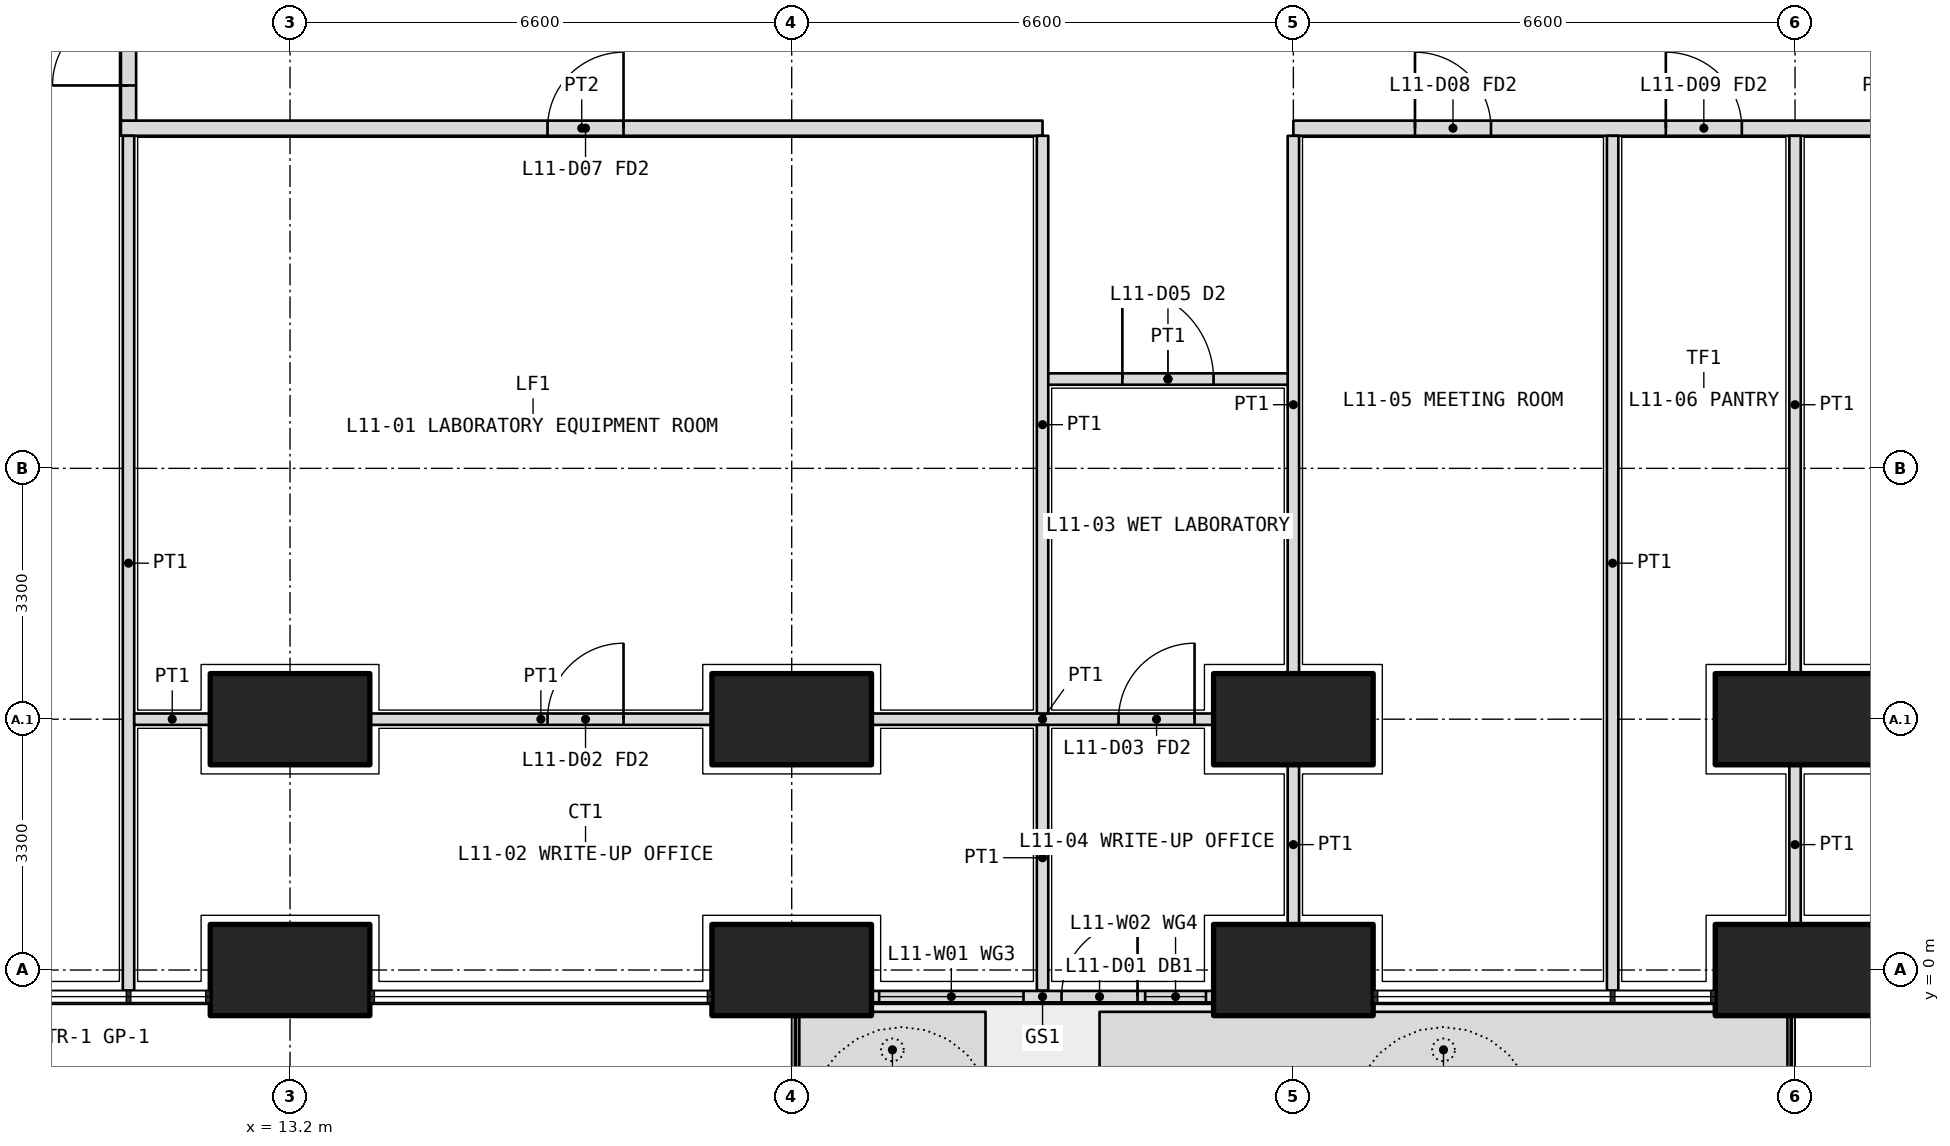
"""IFC4 building model, lengths in metres.
Left out: names, types, materials, properties, quantities, classifications, styles, units other than length and angle.
Written with IfcOpenShell. Run it as: python <this file> out.ifc"""

import sys

from ifc_helpers import new_model, si_unit, direction, frame, frame_2d, origin, origin_2d, place, context, subcontext, project, spatial, polyline, rectangle, outline, extrude, element, fill, save


model = new_model("IFC4")
c1 = context("Model", 3, precision=1e-05, world=origin(), true_north=direction((0.0, 1.0)))
c2 = subcontext(c1, "Body", "Model", "MODEL_VIEW")
j1 = project(units=[si_unit("LENGTHUNIT", "METRE"), si_unit("PLANEANGLEUNIT", "RADIAN")], contexts=[c1])
p1 = place(None, origin())
s1 = spatial("IfcSite", under=j1, at=p1, CompositionType="ELEMENT")
p2 = place(p1, origin())
s2 = spatial("IfcBuilding", under=s1, at=p2, CompositionType="ELEMENT")
p3 = place(p2, frame((0.0, 0.0, 50.7)))
s3 = spatial("IfcBuildingStorey", under=s2, at=p3, CompositionType="ELEMENT", Elevation=50.7)
for number, where, z_axis, x_axis in (
    (1, (13.2, 0.0, 0.0), (0.0, 0.0, 1.0), (1.0, 0.0, 0.0)),
    (2, (19.8, 0.0, 0.0), (0.0, 0.0, 1.0), (1.0, 0.0, 0.0)),
    (3, (26.4, 0.0, 0.0), (0.0, 0.0, 1.0), (1.0, 0.0, 0.0)),
    (4, (33.0, 0.0, 0.0), (0.0, 0.0, 1.0), (1.0, 0.0, 0.0)),
    (5, (13.2, 3.3, 0.0), (0.0, 0.0, 1.0), (1.0, 0.0, 0.0)),
    (6, (19.8, 3.3, 0.0), (0.0, 0.0, 1.0), (1.0, 0.0, 0.0)),
    (7, (26.4, 3.3, 0.0), (0.0, 0.0, 1.0), (1.0, 0.0, 0.0)),
    (8, (33.0, 3.3, 0.0), (0.0, 0.0, 1.0), (1.0, 0.0, 0.0)),
):
    element("IfcColumn", number, at=place(p3, frame(where, z_axis=z_axis, x_axis=x_axis)), inside=s3, PredefinedType="COLUMN", context=c2, shape_type="SweptSolid", body=[
        extrude(rectangle(XDim=2.1, YDim=1.2, at=origin_2d()), origin(), (0.0, 0.0, 1.0), 4.2),
    ])
p4 = place(p3, origin())
e9 = element("IfcWall", 9, at=p4, inside=s3, PredefinedType="USERDEFINED", context=c2, shape_type="SweptSolid", body=[
    extrude(outline(polyline([(19.9, -1.55), (22.35, -1.55), (22.35, -0.55), (19.9, -0.55), (19.9, -1.55)]), holes=[polyline([(20.05, -1.4), (22.2, -1.4), (22.2, -0.7), (20.05, -0.7), (20.05, -1.4)])]), origin(), (0.0, 0.0, 1.0), 1.05),
])
p5 = place(p3, origin())
e10 = element("IfcWall", 10, at=p5, inside=s3, PredefinedType="USERDEFINED", context=c2, shape_type="SweptSolid", body=[
    extrude(outline(polyline([(23.85, -1.55), (32.9, -1.55), (32.9, -0.55), (23.85, -0.55), (23.85, -1.55)]), holes=[polyline([(24.0, -1.4), (32.75, -1.4), (32.75, -0.7), (24.0, -0.7), (24.0, -1.4)])]), origin(), (0.0, 0.0, 1.0), 1.05),
])
p6 = place(p3, frame((20.85, -0.35, 0.0), z_axis=(0.0, 0.0, 1.0), x_axis=(1.0, 0.0, 0.0)))
e11 = element("IfcWall", 11, at=p6, inside=s3, PredefinedType="SOLIDWALL", context=c2, shape_type="SweptSolid", body=[
    extrude(rectangle(XDim=4.5, YDim=0.15, at=frame_2d((2.25, 0.0))), origin(), (0.0, 0.0, 1.0), 2.7),
])
p7 = place(p6, frame((2.5, 0.0, 0.0)))
e12 = element("IfcOpeningElement", 12, at=p7, cuts=e11, PredefinedType="OPENING", context=c2, shape_type="SweptSolid", body=[
    extrude(rectangle(XDim=1.0, YDim=2.4, at=frame_2d((0.5, 1.2))), frame((0.0, 0.085, 0.0), z_axis=(0.0, -1.0, 0.0), x_axis=(1.0, 0.0, 0.0)), (0.0, 0.0, 1.0), 0.17),
])
p8 = place(p6, frame((0.1, 0.0, 0.1)))
e13 = element("IfcOpeningElement", 13, at=p8, cuts=e11, PredefinedType="OPENING", context=c2, shape_type="SweptSolid", body=[
    extrude(rectangle(XDim=1.9, YDim=2.3, at=frame_2d((0.95, 1.15))), frame((0.0, 0.085, 0.0), z_axis=(0.0, -1.0, 0.0), x_axis=(1.0, 0.0, 0.0)), (0.0, 0.0, 1.0), 0.17),
])
p9 = place(p6, frame((3.6, 0.0, 0.1)))
e14 = element("IfcOpeningElement", 14, at=p9, cuts=e11, PredefinedType="OPENING", context=c2, shape_type="SweptSolid", body=[
    extrude(rectangle(XDim=0.8, YDim=2.3, at=frame_2d((0.4, 1.15))), frame((0.0, 0.085, 0.0), z_axis=(0.0, -1.0, 0.0), x_axis=(1.0, 0.0, 0.0)), (0.0, 0.0, 1.0), 0.17),
])
p10 = place(p3, frame((10.975, 11.075, 0.0), z_axis=(0.0, 0.0, 1.0), x_axis=(1.0, 0.0, 0.0)))
e15 = element("IfcWall", 15, at=p10, inside=s3, PredefinedType="PARTITIONING", context=c2, shape_type="SweptSolid", body=[
    extrude(rectangle(XDim=12.125, YDim=0.2, at=frame_2d((6.062, 0.0))), origin(), (0.0, 0.0, 1.0), 2.85),
])
p11 = place(p10, frame((5.613, 0.0, 0.0)))
e16 = element("IfcOpeningElement", 16, at=p11, cuts=e15, PredefinedType="OPENING", context=c2, shape_type="SweptSolid", body=[
    extrude(rectangle(XDim=1.0, YDim=2.1, at=frame_2d((0.5, 1.05))), frame((0.0, 0.11, 0.0), z_axis=(0.0, -1.0, 0.0), x_axis=(1.0, 0.0, 0.0)), (0.0, 0.0, 1.0), 0.22),
])
p12 = place(p3, frame((26.4, 11.075, 0.0), z_axis=(0.0, 0.0, 1.0), x_axis=(1.0, 0.0, 0.0)))
e17 = element("IfcWall", 17, at=p12, inside=s3, PredefinedType="PARTITIONING", context=c2, shape_type="SweptSolid", body=[
    extrude(rectangle(XDim=15.425, YDim=0.2, at=frame_2d((7.712, 0.0))), origin(), (0.0, 0.0, 1.0), 2.85),
])
p13 = place(p12, frame((1.6, 0.0, 0.0)))
e18 = element("IfcOpeningElement", 18, at=p13, cuts=e17, PredefinedType="OPENING", context=c2, shape_type="SweptSolid", body=[
    extrude(rectangle(XDim=1.0, YDim=2.1, at=frame_2d((0.5, 1.05))), frame((0.0, 0.11, 0.0), z_axis=(0.0, -1.0, 0.0), x_axis=(1.0, 0.0, 0.0)), (0.0, 0.0, 1.0), 0.22),
])
p14 = place(p12, frame((4.9, 0.0, 0.0)))
e19 = element("IfcOpeningElement", 19, at=p14, cuts=e17, PredefinedType="OPENING", context=c2, shape_type="SweptSolid", body=[
    extrude(rectangle(XDim=1.0, YDim=2.1, at=frame_2d((0.5, 1.05))), frame((0.0, 0.11, 0.0), z_axis=(0.0, -1.0, 0.0), x_axis=(1.0, 0.0, 0.0)), (0.0, 0.0, 1.0), 0.22),
])
p15 = place(p12, frame((10.363, 0.0, 0.0)))
e20 = element("IfcOpeningElement", 20, at=p15, cuts=e17, PredefinedType="OPENING", context=c2, shape_type="SweptSolid", body=[
    extrude(rectangle(XDim=1.2, YDim=2.1, at=frame_2d((0.6, 1.05))), frame((0.0, 0.11, 0.0), z_axis=(0.0, -1.0, 0.0), x_axis=(1.0, 0.0, 0.0)), (0.0, 0.0, 1.0), 0.22),
])
p16 = place(p3, frame((11.075, 11.175, 0.0), z_axis=(0.0, 0.0, 1.0), x_axis=(0.0, 1.0, 0.0)))
e21 = element("IfcWall", 21, at=p16, inside=s3, PredefinedType="PARTITIONING", context=c2, shape_type="SweptSolid", body=[
    extrude(rectangle(XDim=23.85, YDim=0.2, at=frame_2d((11.925, 0.0))), origin(), (0.0, 0.0, 1.0), 2.85),
])
p17 = place(p16, frame((0.462, 0.0, 0.0)))
e22 = element("IfcOpeningElement", 22, at=p17, cuts=e21, PredefinedType="OPENING", context=c2, shape_type="SweptSolid", body=[
    extrude(rectangle(XDim=1.0, YDim=2.1, at=frame_2d((0.5, 1.05))), frame((0.0, 0.11, 0.0), z_axis=(0.0, -1.0, 0.0), x_axis=(1.0, 0.0, 0.0)), (0.0, 0.0, 1.0), 0.22),
])
p18 = place(p16, frame((2.575, 0.0, 0.0)))
e23 = element("IfcOpeningElement", 23, at=p18, cuts=e21, PredefinedType="OPENING", context=c2, shape_type="SweptSolid", body=[
    extrude(rectangle(XDim=1.0, YDim=2.1, at=frame_2d((0.5, 1.05))), frame((0.0, 0.11, 0.0), z_axis=(0.0, -1.0, 0.0), x_axis=(1.0, 0.0, 0.0)), (0.0, 0.0, 1.0), 0.22),
])
p19 = place(p16, frame((5.65, 0.0, 0.0)))
e24 = element("IfcOpeningElement", 24, at=p19, cuts=e21, PredefinedType="OPENING", context=c2, shape_type="SweptSolid", body=[
    extrude(rectangle(XDim=0.9, YDim=2.1, at=frame_2d((0.45, 1.05))), frame((0.0, 0.11, 0.0), z_axis=(0.0, -1.0, 0.0), x_axis=(1.0, 0.0, 0.0)), (0.0, 0.0, 1.0), 0.22),
])
p20 = place(p16, frame((9.5, 0.0, 0.0)))
e25 = element("IfcOpeningElement", 25, at=p20, cuts=e21, PredefinedType="OPENING", context=c2, shape_type="SweptSolid", body=[
    extrude(rectangle(XDim=0.9, YDim=2.1, at=frame_2d((0.45, 1.05))), frame((0.0, 0.11, 0.0), z_axis=(0.0, -1.0, 0.0), x_axis=(1.0, 0.0, 0.0)), (0.0, 0.0, 1.0), 0.22),
])
p21 = place(p16, frame((13.025, 0.0, 0.0)))
e26 = element("IfcOpeningElement", 26, at=p21, cuts=e21, PredefinedType="OPENING", context=c2, shape_type="SweptSolid", body=[
    extrude(rectangle(XDim=1.0, YDim=2.1, at=frame_2d((0.5, 1.05))), frame((0.0, 0.11, 0.0), z_axis=(0.0, -1.0, 0.0), x_axis=(1.0, 0.0, 0.0)), (0.0, 0.0, 1.0), 0.22),
])
p22 = place(p16, frame((18.025, 0.0, 0.0)))
e27 = element("IfcOpeningElement", 27, at=p22, cuts=e21, PredefinedType="OPENING", context=c2, shape_type="SweptSolid", body=[
    extrude(rectangle(XDim=1.0, YDim=2.1, at=frame_2d((0.5, 1.05))), frame((0.0, 0.11, 0.0), z_axis=(0.0, -1.0, 0.0), x_axis=(1.0, 0.0, 0.0)), (0.0, 0.0, 1.0), 0.22),
])
p23 = place(p16, frame((22.387, 0.0, 0.0)))
e28 = element("IfcOpeningElement", 28, at=p23, cuts=e21, PredefinedType="OPENING", context=c2, shape_type="SweptSolid", body=[
    extrude(rectangle(XDim=1.0, YDim=2.1, at=frame_2d((0.5, 1.05))), frame((0.0, 0.11, 0.0), z_axis=(0.0, -1.0, 0.0), x_axis=(1.0, 0.0, 0.0)), (0.0, 0.0, 1.0), 0.22),
])
p24 = place(p3, frame((11.075, -0.27, 0.0), z_axis=(0.0, 0.0, 1.0), x_axis=(0.0, 1.0, 0.0)))
e29 = element("IfcWall", 29, at=p24, inside=s3, PredefinedType="PARTITIONING", context=c2, shape_type="SweptSolid", body=[
    extrude(rectangle(XDim=11.245, YDim=0.15, at=frame_2d((5.623, 0.0))), origin(), (0.0, 0.0, 1.0), 2.7),
])
p25 = place(p3, frame((11.15, 3.3, 0.0), z_axis=(0.0, 0.0, 1.0), x_axis=(1.0, 0.0, 0.0)))
e30 = element("IfcWall", 30, at=p25, inside=s3, PredefinedType="PARTITIONING", context=c2, shape_type="SweptSolid", body=[
    extrude(rectangle(XDim=1.0, YDim=0.15, at=frame_2d((0.5, 0.0))), origin(), (0.0, 0.0, 1.0), 3.9),
])
p26 = place(p3, frame((14.25, 3.3, 0.0), z_axis=(0.0, 0.0, 1.0), x_axis=(1.0, 0.0, 0.0)))
e31 = element("IfcWall", 31, at=p26, inside=s3, PredefinedType="PARTITIONING", context=c2, shape_type="SweptSolid", body=[
    extrude(rectangle(XDim=4.5, YDim=0.15, at=frame_2d((2.25, 0.0))), origin(), (0.0, 0.0, 1.0), 3.9),
])
p27 = place(p26, frame((2.337, 0.0, 0.0)))
e32 = element("IfcOpeningElement", 32, at=p27, cuts=e31, PredefinedType="OPENING", context=c2, shape_type="SweptSolid", body=[
    extrude(rectangle(XDim=1.0, YDim=2.1, at=frame_2d((0.5, 1.05))), frame((0.0, 0.085, 0.0), z_axis=(0.0, -1.0, 0.0), x_axis=(1.0, 0.0, 0.0)), (0.0, 0.0, 1.0), 0.17),
])
p28 = place(p3, frame((20.85, 3.3, 0.0), z_axis=(0.0, 0.0, 1.0), x_axis=(1.0, 0.0, 0.0)))
e33 = element("IfcWall", 33, at=p28, inside=s3, PredefinedType="PARTITIONING", context=c2, shape_type="SweptSolid", body=[
    extrude(rectangle(XDim=4.5, YDim=0.15, at=frame_2d((2.25, 0.0))), origin(), (0.0, 0.0, 1.0), 3.9),
])
p29 = place(p28, frame((3.25, 0.0, 0.0)))
e34 = element("IfcOpeningElement", 34, at=p29, cuts=e33, PredefinedType="OPENING", context=c2, shape_type="SweptSolid", body=[
    extrude(rectangle(XDim=1.0, YDim=2.1, at=frame_2d((0.5, 1.05))), frame((0.0, 0.085, 0.0), z_axis=(0.0, -1.0, 0.0), x_axis=(1.0, 0.0, 0.0)), (0.0, 0.0, 1.0), 0.17),
])
p30 = place(p3, frame((23.1, 7.775, 0.0), z_axis=(0.0, 0.0, 1.0), x_axis=(1.0, 0.0, 0.0)))
e35 = element("IfcWall", 35, at=p30, inside=s3, PredefinedType="PARTITIONING", context=c2, shape_type="SweptSolid", body=[
    extrude(rectangle(XDim=3.3, YDim=0.15, at=frame_2d((1.65, 0.0))), origin(), (0.0, 0.0, 1.0), 2.85),
])
p31 = place(p30, frame((1.05, 0.0, 0.0)))
e36 = element("IfcOpeningElement", 36, at=p31, cuts=e35, PredefinedType="OPENING", context=c2, shape_type="SweptSolid", body=[
    extrude(rectangle(XDim=1.2, YDim=2.1, at=frame_2d((0.6, 1.05))), frame((0.0, 0.085, 0.0), z_axis=(0.0, -1.0, 0.0), x_axis=(1.0, 0.0, 0.0)), (0.0, 0.0, 1.0), 0.17),
])
p32 = place(p3, frame((30.6, -0.27, 0.0), z_axis=(0.0, 0.0, 1.0), x_axis=(0.0, 1.0, 0.0)))
e37 = element("IfcWall", 37, at=p32, inside=s3, PredefinedType="PARTITIONING", context=c2, shape_type="SweptSolid", body=[
    extrude(rectangle(XDim=11.245, YDim=0.15, at=frame_2d((5.623, 0.0))), origin(), (0.0, 0.0, 1.0), 2.7),
])
p33 = place(p3, frame((33.0, 0.6, 0.0), z_axis=(0.0, 0.0, 1.0), x_axis=(0.0, 1.0, 0.0)))
e38 = element("IfcWall", 38, at=p33, inside=s3, PredefinedType="PARTITIONING", context=c2, shape_type="SweptSolid", body=[
    extrude(rectangle(XDim=2.1, YDim=0.15, at=frame_2d((1.05, 0.0))), origin(), (0.0, 0.0, 1.0), 2.85),
])
p34 = place(p3, frame((33.0, 3.9, 0.0), z_axis=(0.0, 0.0, 1.0), x_axis=(0.0, 1.0, 0.0)))
e39 = element("IfcWall", 39, at=p34, inside=s3, PredefinedType="PARTITIONING", context=c2, shape_type="SweptSolid", body=[
    extrude(rectangle(XDim=7.075, YDim=0.15, at=frame_2d((3.538, 0.0))), origin(), (0.0, 0.0, 1.0), 2.85),
])
p35 = place(p3, frame((23.1, -0.27, 0.0), z_axis=(0.0, 0.0, 1.0), x_axis=(0.0, 1.0, 0.0)))
e40 = element("IfcWall", 40, at=p35, inside=s3, PredefinedType="PARTITIONING", context=c2, shape_type="SweptSolid", body=[
    extrude(rectangle(XDim=3.495, YDim=0.15, at=frame_2d((1.748, 0.0))), origin(), (0.0, 0.0, 1.0), 2.7),
])
p36 = place(p3, frame((23.1, 3.375, 0.0), z_axis=(0.0, 0.0, 1.0), x_axis=(0.0, 1.0, 0.0)))
e41 = element("IfcWall", 41, at=p36, inside=s3, PredefinedType="PARTITIONING", context=c2, shape_type="SweptSolid", body=[
    extrude(rectangle(XDim=7.6, YDim=0.15, at=frame_2d((3.8, 0.0))), origin(), (0.0, 0.0, 1.0), 3.9),
])
p37 = place(p3, frame((26.4, 0.6, 0.0), z_axis=(0.0, 0.0, 1.0), x_axis=(0.0, 1.0, 0.0)))
e42 = element("IfcWall", 42, at=p37, inside=s3, PredefinedType="PARTITIONING", context=c2, shape_type="SweptSolid", body=[
    extrude(rectangle(XDim=2.1, YDim=0.15, at=frame_2d((1.05, 0.0))), origin(), (0.0, 0.0, 1.0), 2.85),
])
p38 = place(p3, frame((26.4, 3.9, 0.0), z_axis=(0.0, 0.0, 1.0), x_axis=(0.0, 1.0, 0.0)))
e43 = element("IfcWall", 43, at=p38, inside=s3, PredefinedType="PARTITIONING", context=c2, shape_type="SweptSolid", body=[
    extrude(rectangle(XDim=7.075, YDim=0.15, at=frame_2d((3.538, 0.0))), origin(), (0.0, 0.0, 1.0), 2.85),
])
p39 = place(p7, origin())
e44 = element("IfcDoor", 44, at=p39, inside=s3, OperationType="SINGLE_SWING_RIGHT", PredefinedType="DOOR", context=c2, shape_type="SweptSolid", body=[
    extrude(rectangle(XDim=1.0, YDim=2.4, at=frame_2d((0.5, 1.2))), frame((0.0, 0.025, 0.0), z_axis=(0.0, -1.0, 0.0), x_axis=(1.0, 0.0, 0.0)), (0.0, 0.0, 1.0), 0.05),
])
fill(e12, e44)
p40 = place(p8, origin())
e45 = element("IfcWindow", 45, at=p40, inside=s3, PartitioningType="SINGLE_PANEL", PredefinedType="WINDOW", context=c2, shape_type="SweptSolid", body=[
    extrude(rectangle(XDim=1.9, YDim=2.3, at=frame_2d((0.95, 1.15))), frame((0.0, 0.03, 0.0), z_axis=(0.0, -1.0, 0.0), x_axis=(1.0, 0.0, 0.0)), (0.0, 0.0, 1.0), 0.06),
])
fill(e13, e45)
p41 = place(p9, origin())
e46 = element("IfcWindow", 46, at=p41, inside=s3, PartitioningType="SINGLE_PANEL", PredefinedType="WINDOW", context=c2, shape_type="SweptSolid", body=[
    extrude(rectangle(XDim=0.8, YDim=2.3, at=frame_2d((0.4, 1.15))), frame((0.0, 0.03, 0.0), z_axis=(0.0, -1.0, 0.0), x_axis=(1.0, 0.0, 0.0)), (0.0, 0.0, 1.0), 0.06),
])
fill(e14, e46)
p42 = place(p11, origin())
e47 = element("IfcDoor", 47, at=p42, inside=s3, OperationType="SINGLE_SWING_RIGHT", PredefinedType="DOOR", context=c2, shape_type="SweptSolid", body=[
    extrude(rectangle(XDim=1.0, YDim=2.1, at=frame_2d((0.5, 1.05))), frame((0.0, 0.025, 0.0), z_axis=(0.0, -1.0, 0.0), x_axis=(1.0, 0.0, 0.0)), (0.0, 0.0, 1.0), 0.05),
])
fill(e16, e47)
p43 = place(p27, origin())
e48 = element("IfcDoor", 48, at=p43, inside=s3, OperationType="SINGLE_SWING_RIGHT", PredefinedType="DOOR", context=c2, shape_type="SweptSolid", body=[
    extrude(rectangle(XDim=1.0, YDim=2.1, at=frame_2d((0.5, 1.05))), frame((0.0, 0.025, 0.0), z_axis=(0.0, -1.0, 0.0), x_axis=(1.0, 0.0, 0.0)), (0.0, 0.0, 1.0), 0.05),
])
fill(e32, e48)
p44 = place(p31, origin())
e49 = element("IfcDoor", 49, at=p44, inside=s3, OperationType="DOUBLE_DOOR_SINGLE_SWING", PredefinedType="DOOR", context=c2, shape_type="SweptSolid", body=[
    extrude(rectangle(XDim=1.2, YDim=2.1, at=frame_2d((0.6, 1.05))), frame((0.0, 0.025, 0.0), z_axis=(0.0, -1.0, 0.0), x_axis=(1.0, 0.0, 0.0)), (0.0, 0.0, 1.0), 0.05),
])
fill(e36, e49)
p45 = place(p29, origin())
e50 = element("IfcDoor", 50, at=p45, inside=s3, OperationType="SINGLE_SWING_RIGHT", PredefinedType="DOOR", context=c2, shape_type="SweptSolid", body=[
    extrude(rectangle(XDim=1.0, YDim=2.1, at=frame_2d((0.5, 1.05))), frame((0.0, 0.025, 0.0), z_axis=(0.0, -1.0, 0.0), x_axis=(1.0, 0.0, 0.0)), (0.0, 0.0, 1.0), 0.05),
])
fill(e34, e50)
p46 = place(p13, origin())
e51 = element("IfcDoor", 51, at=p46, inside=s3, OperationType="SINGLE_SWING_LEFT", PredefinedType="DOOR", context=c2, shape_type="SweptSolid", body=[
    extrude(rectangle(XDim=1.0, YDim=2.1, at=frame_2d((0.5, 1.05))), frame((0.0, 0.025, 0.0), z_axis=(0.0, -1.0, 0.0), x_axis=(1.0, 0.0, 0.0)), (0.0, 0.0, 1.0), 0.05),
])
fill(e18, e51)
p47 = place(p14, origin())
e52 = element("IfcDoor", 52, at=p47, inside=s3, OperationType="SINGLE_SWING_LEFT", PredefinedType="DOOR", context=c2, shape_type="SweptSolid", body=[
    extrude(rectangle(XDim=1.0, YDim=2.1, at=frame_2d((0.5, 1.05))), frame((0.0, 0.025, 0.0), z_axis=(0.0, -1.0, 0.0), x_axis=(1.0, 0.0, 0.0)), (0.0, 0.0, 1.0), 0.05),
])
fill(e19, e52)
p48 = place(p17, origin())
e53 = element("IfcDoor", 53, at=p48, inside=s3, OperationType="SINGLE_SWING_LEFT", PredefinedType="DOOR", context=c2, shape_type="SweptSolid", body=[
    extrude(rectangle(XDim=1.0, YDim=2.1, at=frame_2d((0.5, 1.05))), frame((0.0, 0.025, 0.0), z_axis=(0.0, -1.0, 0.0), x_axis=(1.0, 0.0, 0.0)), (0.0, 0.0, 1.0), 0.05),
])
fill(e22, e53)
save(model, sys.argv[1])
